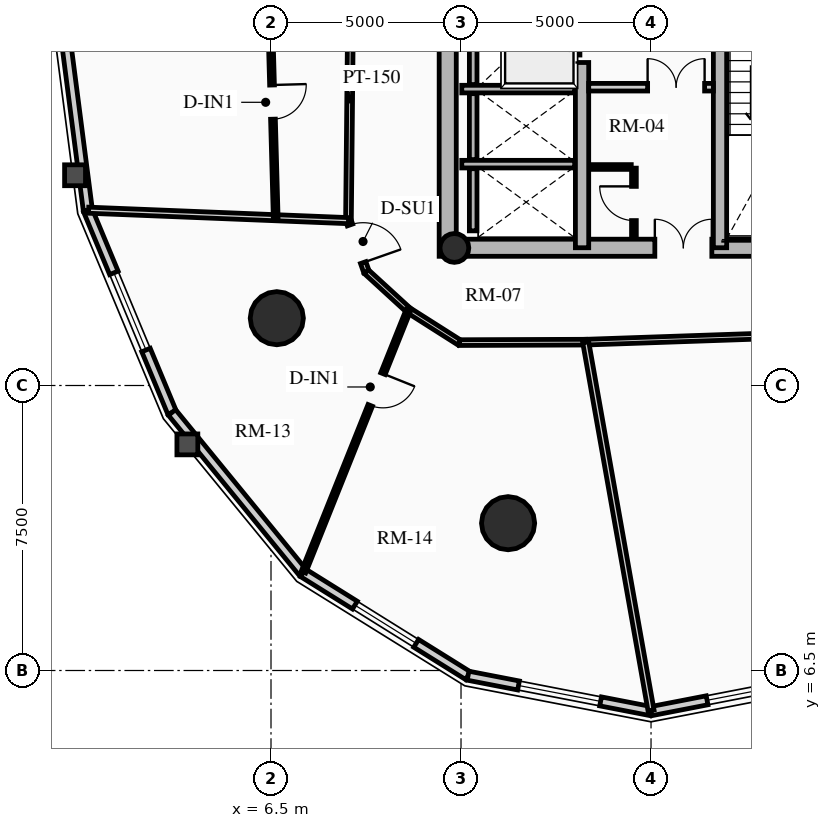
"""IFC4 building model, lengths in metres.
Left out: names, types, materials, properties, quantities, classifications, styles, units other than length and angle.
Written with IfcOpenShell. Run it as: python <this file> out.ifc"""

import sys

from ifc_helpers import new_model, si_unit, direction, frame, frame_2d, origin, origin_2d, place, context, subcontext, project, spatial, rectangle, circle, hollow_circle, extrude, source, transform, mapped, element, fill, save


model = new_model("IFC4")
c1 = context("Model", 3, precision=1e-05, world=origin(), true_north=direction((0.0, 1.0)))
c2 = subcontext(c1, "Body", "Model", "MODEL_VIEW")
j1 = project(units=[si_unit("LENGTHUNIT", "METRE"), si_unit("PLANEANGLEUNIT", "RADIAN")], contexts=[c1])
p1 = place(None, origin())
s1 = spatial("IfcSite", under=j1, at=p1, CompositionType="ELEMENT")
p2 = place(p1, origin())
s2 = spatial("IfcBuilding", under=s1, at=p2, CompositionType="ELEMENT")
p3 = place(p2, frame((0.0, 0.0, 116.71)))
s3 = spatial("IfcBuildingStorey", under=s2, at=p3, CompositionType="ELEMENT", Elevation=116.71)
p4 = place(p3, frame((11.15, 17.4, 0.0), z_axis=(0.0, 0.0, 1.0), x_axis=(0.0, 1.0, 0.0)))
e1 = element("IfcWall", 1, at=p4, inside=s3, PredefinedType="SHEAR", context=c2, shape_type="SweptSolid", body=[
    extrude(rectangle(XDim=14.2, YDim=0.45, at=frame_2d((7.1, 0.0))), origin(), (0.0, 0.0, 1.0), 2.91),
])
p5 = place(p3, frame((11.15, 17.625, 0.0), z_axis=(0.0, 0.0, 1.0), x_axis=(1.0, 0.0, 0.0)))
e2 = element("IfcWall", 2, at=p5, inside=s3, PredefinedType="SHEAR", context=c2, shape_type="SweptSolid", body=[
    extrude(rectangle(XDim=10.7, YDim=0.45, at=frame_2d((5.35, 0.0))), origin(), (0.0, 0.0, 1.0), 2.91),
])
m1 = source(origin(), c2, "Body", "SweptSolid", [
    extrude(rectangle(XDim=1.5, YDim=2.02, at=frame_2d((0.75, 1.01))), frame((0.0, 0.235, 0.0), z_axis=(0.0, -1.0, 0.0), x_axis=(1.0, 0.0, 0.0)), (0.0, 0.0, 1.0), 0.47),
])
p6 = place(p5, frame((5.45, 0.0, 0.0)))
e3 = element("IfcOpeningElement", 3, at=p6, cuts=e2, PredefinedType="OPENING", context=c2, shape_type="MappedRepresentation", body=[
    mapped(m1, transform((0.0, 0.0, 0.0), x_axis=(1.0, 0.0, 0.0), y_axis=(0.0, 1.0, 0.0), z_axis=(0.0, 0.0, 1.0), scale=1.0)),
])
p7 = place(p3, frame((14.685, 17.625, 0.0), z_axis=(0.0, 0.0, 1.0), x_axis=(0.0, 1.0, 0.0)))
e4 = element("IfcWall", 4, at=p7, inside=s3, PredefinedType="SHEAR", context=c2, shape_type="SweptSolid", body=[
    extrude(rectangle(XDim=13.75, YDim=0.35, at=frame_2d((6.875, 0.0))), origin(), (0.0, 0.0, 1.0), 2.91),
])
m2 = source(origin(), c2, "Body", "SweptSolid", [
    extrude(rectangle(XDim=1.1, YDim=2.015, at=frame_2d((0.55, 1.007))), frame((0.0, 0.185, 0.0), z_axis=(0.0, -1.0, 0.0), x_axis=(1.0, 0.0, 0.0)), (0.0, 0.0, 1.0), 0.37),
])
p8 = place(p7, frame((4.875, 0.0, 0.0)))
e5 = element("IfcOpeningElement", 5, at=p8, cuts=e4, PredefinedType="OPENING", context=c2, shape_type="MappedRepresentation", body=[
    mapped(m2, transform((0.0, 0.0, 0.0), x_axis=(1.0, 0.0, 0.0), y_axis=(0.0, 1.0, 0.0), z_axis=(0.0, 0.0, 1.0), scale=1.0)),
])
m3 = source(origin(), c2, "Body", "SweptSolid", [
    extrude(rectangle(XDim=1.15, YDim=2.02, at=frame_2d((0.575, 1.01))), frame((0.0, 0.185, 0.0), z_axis=(0.0, -1.0, 0.0), x_axis=(1.0, 0.0, 0.0)), (0.0, 0.0, 1.0), 0.37),
])
p9 = place(p7, frame((7.295, 0.0, 0.0)))
e6 = element("IfcOpeningElement", 6, at=p9, cuts=e4, PredefinedType="OPENING", context=c2, shape_type="MappedRepresentation", body=[
    mapped(m3, transform((0.0, 0.0, 0.0), x_axis=(1.0, 0.0, 0.0), y_axis=(0.0, 1.0, 0.0), z_axis=(0.0, 0.0, 1.0), scale=1.0)),
])
p10 = place(p3, frame((18.315, 17.625, 0.0), z_axis=(0.0, 0.0, 1.0), x_axis=(0.0, 1.0, 0.0)))
e7 = element("IfcWall", 7, at=p10, inside=s3, PredefinedType="SHEAR", context=c2, shape_type="SweptSolid", body=[
    extrude(rectangle(XDim=13.75, YDim=0.35, at=frame_2d((6.875, 0.0))), origin(), (0.0, 0.0, 1.0), 2.91),
])
p11 = place(p10, frame((10.0, 0.0, 0.0)))
e8 = element("IfcOpeningElement", 8, at=p11, cuts=e7, PredefinedType="OPENING", context=c2, shape_type="MappedRepresentation", body=[
    mapped(m2, transform((0.0, 0.0, 0.0), x_axis=(1.0, 0.0, 0.0), y_axis=(0.0, 1.0, 0.0), z_axis=(0.0, 0.0, 1.0), scale=1.0)),
])
p12 = place(p10, frame((12.0, 0.0, 0.0)))
e9 = element("IfcOpeningElement", 9, at=p12, cuts=e7, PredefinedType="OPENING", context=c2, shape_type="MappedRepresentation", body=[
    mapped(m2, transform((0.0, 0.0, 0.0), x_axis=(1.0, 0.0, 0.0), y_axis=(0.0, 1.0, 0.0), z_axis=(0.0, 0.0, 1.0), scale=1.0)),
])
p13 = place(p10, frame((5.305, 0.0, 0.0)))
e10 = element("IfcOpeningElement", 10, at=p13, cuts=e7, PredefinedType="OPENING", context=c2, shape_type="MappedRepresentation", body=[
    mapped(m3, transform((0.0, 0.0, 0.0), x_axis=(1.0, 0.0, 0.0), y_axis=(0.0, 1.0, 0.0), z_axis=(0.0, 0.0, 1.0), scale=1.0)),
])
p14 = place(p3, frame((11.325, 17.62, 0.0), z_axis=(0.0, 0.0, 1.0), x_axis=(1.0, 0.0, 0.0)))
e11 = element("IfcColumn", 11, at=p14, inside=s3, PredefinedType="COLUMN", context=c2, shape_type="SweptSolid", body=[
    extrude(hollow_circle(Radius=0.38, WallThickness=0.032, at=origin_2d()), origin(), (0.0, 0.0, 1.0), 2.91),
])
for number, where, z_axis, x_axis in (
    (12, (6.653, 15.771, 0.0), (0.0, 0.0, 1.0), (1.0, 0.0, 0.0)),
    (13, (12.739, 10.377, 0.0), (0.0, 0.0, 1.0), (1.0, 0.0, 0.0)),
):
    element("IfcColumn", number, at=place(p3, frame(where, z_axis=z_axis, x_axis=x_axis)), inside=s3, PredefinedType="USERDEFINED", context=c2, shape_type="SweptSolid", body=[
        extrude(circle(Radius=0.7, at=origin_2d()), origin(), (0.0, 0.0, 1.0), 2.91),
    ])
p15 = place(p3, frame((1.682, 18.607, 0.0), z_axis=(0.0, 0.0, 1.0), x_axis=(-0.128351991996, 0.991728675672, 0.0)))
e14 = element("IfcWall", 14, at=p15, inside=s3, PredefinedType="SOLIDWALL", context=c2, shape_type="SweptSolid", body=[
    extrude(rectangle(XDim=5.942, YDim=0.24, at=frame_2d((2.971, 0.0))), origin(), (0.0, 0.0, 1.0), 2.179),
])
p16 = place(p3, frame((3.895, 13.291, 0.0), z_axis=(0.0, 0.0, 1.0), x_axis=(-0.384344417632, 0.923189779317, 0.0)))
e15 = element("IfcWall", 15, at=p16, inside=s3, PredefinedType="SOLIDWALL", context=c2, shape_type="SweptSolid", body=[
    extrude(rectangle(XDim=5.758, YDim=0.24, at=frame_2d((2.879, 0.0))), origin(), (0.0, 0.0, 1.0), 2.179),
])
m4 = source(origin(), c2, "Body", "SweptSolid", [
    extrude(rectangle(XDim=2.2, YDim=1.35, at=frame_2d((1.1, 0.675))), frame((0.0, 0.13, 0.0), z_axis=(0.0, -1.0, 0.0), x_axis=(1.0, 0.0, 0.0)), (0.0, 0.0, 1.0), 0.26),
])
p17 = place(p16, frame((1.779, 0.0, 0.65)))
e16 = element("IfcOpeningElement", 16, at=p17, cuts=e15, PredefinedType="OPENING", context=c2, shape_type="MappedRepresentation", body=[
    mapped(m4, transform((0.0, 0.0, 0.0), x_axis=(1.0, 0.0, 0.0), y_axis=(0.0, 1.0, 0.0), z_axis=(0.0, 0.0, 1.0), scale=1.0)),
])
p18 = place(p3, frame((7.342, 9.072, 0.0), z_axis=(0.0, 0.0, 1.0), x_axis=(-0.632700781152, 0.77439635945, 0.0)))
e17 = element("IfcWall", 17, at=p18, inside=s3, PredefinedType="SOLIDWALL", context=c2, shape_type="SweptSolid", body=[
    extrude(rectangle(XDim=5.448, YDim=0.24, at=frame_2d((2.724, 0.0))), origin(), (0.0, 0.0, 1.0), 2.179),
])
p19 = place(p3, frame((11.685, 6.363, 0.0), z_axis=(0.0, 0.0, 1.0), x_axis=(-0.848520380187, 0.529162701263, 0.0)))
e18 = element("IfcWall", 18, at=p19, inside=s3, PredefinedType="SOLIDWALL", context=c2, shape_type="SweptSolid", body=[
    extrude(rectangle(XDim=5.119, YDim=0.24, at=frame_2d((2.56, 0.0))), origin(), (0.0, 0.0, 1.0), 2.179),
])
m5 = source(origin(), c2, "Body", "SweptSolid", [
    extrude(rectangle(XDim=1.9, YDim=1.35, at=frame_2d((0.95, 0.675))), frame((0.0, 0.13, 0.0), z_axis=(0.0, -1.0, 0.0), x_axis=(1.0, 0.0, 0.0)), (0.0, 0.0, 1.0), 0.26),
])
p20 = place(p19, frame((1.609, 0.0, 0.65)))
e19 = element("IfcOpeningElement", 19, at=p20, cuts=e18, PredefinedType="OPENING", context=c2, shape_type="MappedRepresentation", body=[
    mapped(m5, transform((0.0, 0.0, 0.0), x_axis=(1.0, 0.0, 0.0), y_axis=(0.0, 1.0, 0.0), z_axis=(0.0, 0.0, 1.0), scale=1.0)),
])
p21 = place(p3, frame((16.5, 5.43, 0.0), z_axis=(0.0, 0.0, 1.0), x_axis=(-0.981723785992, 0.190311344954, 0.0)))
e20 = element("IfcWall", 20, at=p21, inside=s3, PredefinedType="SOLIDWALL", context=c2, shape_type="SweptSolid", body=[
    extrude(rectangle(XDim=4.904, YDim=0.24, at=frame_2d((2.452, 0.0))), origin(), (0.0, 0.0, 1.0), 2.179),
])
p22 = place(p21, frame((1.352, 0.0, 0.65)))
e21 = element("IfcOpeningElement", 21, at=p22, cuts=e20, PredefinedType="OPENING", context=c2, shape_type="MappedRepresentation", body=[
    mapped(m4, transform((0.0, 0.0, 0.0), x_axis=(1.0, 0.0, 0.0), y_axis=(0.0, 1.0, 0.0), z_axis=(0.0, 0.0, 1.0), scale=1.0)),
])
p23 = place(p3, frame((21.315, 6.363, 0.0), z_axis=(0.0, 0.0, 1.0), x_axis=(-0.981723785992, -0.190311344954, 0.0)))
e22 = element("IfcWall", 22, at=p23, inside=s3, PredefinedType="SOLIDWALL", context=c2, shape_type="SweptSolid", body=[
    extrude(rectangle(XDim=4.904, YDim=0.24, at=frame_2d((2.452, 0.0))), origin(), (0.0, 0.0, 1.0), 2.179),
])
p24 = place(p23, frame((1.502, 0.0, 0.65)))
e23 = element("IfcOpeningElement", 23, at=p24, cuts=e22, PredefinedType="OPENING", context=c2, shape_type="MappedRepresentation", body=[
    mapped(m5, transform((0.0, 0.0, 0.0), x_axis=(1.0, 0.0, 0.0), y_axis=(0.0, 1.0, 0.0), z_axis=(0.0, 0.0, 1.0), scale=1.0)),
])
p25 = place(p3, frame((11.52, 21.8, 0.0), z_axis=(0.0, 0.0, 1.0), x_axis=(1.0, 0.0, 0.0)))
e24 = element("IfcWall", 24, at=p25, inside=s3, PredefinedType="SHEAR", context=c2, shape_type="SweptSolid", body=[
    extrude(rectangle(XDim=2.97, YDim=0.2, at=frame_2d((1.485, 0.0))), origin(), (0.0, 0.0, 1.0), 2.91),
])
p26 = place(p3, frame((11.82, 21.92, 0.0), z_axis=(0.0, 0.0, 1.0), x_axis=(0.0, 1.0, 0.0)))
e25 = element("IfcWall", 25, at=p26, inside=s3, PredefinedType="SHEAR", context=c2, shape_type="SweptSolid", body=[
    extrude(rectangle(XDim=2.44, YDim=0.2, at=frame_2d((1.22, 0.0))), origin(), (0.0, 0.0, 1.0), 2.91),
])
p27 = place(p3, frame((11.52, 19.825, 0.0), z_axis=(0.0, 0.0, 1.0), x_axis=(1.0, 0.0, 0.0)))
e26 = element("IfcWall", 26, at=p27, inside=s3, PredefinedType="SHEAR", context=c2, shape_type="SweptSolid", body=[
    extrude(rectangle(XDim=2.97, YDim=0.2, at=frame_2d((1.485, 0.0))), origin(), (0.0, 0.0, 1.0), 2.91),
])
p28 = place(p3, frame((11.82, 19.945, 0.0), z_axis=(0.0, 0.0, 1.0), x_axis=(0.0, 1.0, 0.0)))
e27 = element("IfcWall", 27, at=p28, inside=s3, PredefinedType="SHEAR", context=c2, shape_type="SweptSolid", body=[
    extrude(rectangle(XDim=1.735, YDim=0.2, at=frame_2d((0.867, 0.0))), origin(), (0.0, 0.0, 1.0), 2.91),
])
p29 = place(p3, frame((11.82, 18.07, 0.0), z_axis=(0.0, 0.0, 1.0), x_axis=(0.0, 1.0, 0.0)))
e28 = element("IfcWall", 28, at=p29, inside=s3, PredefinedType="SHEAR", context=c2, shape_type="SweptSolid", body=[
    extrude(rectangle(XDim=1.635, YDim=0.2, at=frame_2d((0.817, 0.0))), origin(), (0.0, 0.0, 1.0), 2.91),
])
p30 = place(p3, frame((14.86, 21.85, 0.0), z_axis=(0.0, 0.0, 1.0), x_axis=(1.0, 0.0, 0.0)))
e29 = element("IfcWall", 29, at=p30, inside=s3, PredefinedType="PARTITIONING", context=c2, shape_type="SweptSolid", body=[
    extrude(rectangle(XDim=3.28, YDim=0.2, at=frame_2d((1.64, 0.0))), origin(), (0.0, 0.0, 1.0), 2.655),
])
m6 = source(origin(), c2, "Body", "SweptSolid", [
    extrude(rectangle(XDim=1.5, YDim=2.02, at=frame_2d((0.75, 1.01))), frame((0.0, 0.11, 0.0), z_axis=(0.0, -1.0, 0.0), x_axis=(1.0, 0.0, 0.0)), (0.0, 0.0, 1.0), 0.22),
])
p31 = place(p30, frame((1.55, 0.0, 0.0)))
e30 = element("IfcOpeningElement", 30, at=p31, cuts=e29, PredefinedType="OPENING", context=c2, shape_type="MappedRepresentation", body=[
    mapped(m6, transform((0.0, 0.0, 0.0), x_axis=(1.0, 0.0, 0.0), y_axis=(0.0, 1.0, 0.0), z_axis=(0.0, 0.0, 1.0), scale=1.0)),
])
p32 = place(p3, frame((16.05, 17.92, 0.0), z_axis=(0.0, 0.0, 1.0), x_axis=(0.0, 1.0, 0.0)))
e31 = element("IfcWall", 31, at=p32, inside=s3, PredefinedType="PARTITIONING", context=c2, shape_type="SweptSolid", body=[
    extrude(rectangle(XDim=1.8, YDim=0.125, at=frame_2d((0.9, 0.0))), origin(), (0.0, 0.0, 1.0), 2.655),
])
m7 = source(origin(), c2, "Body", "SweptSolid", [
    extrude(rectangle(XDim=0.9, YDim=2.005, at=frame_2d((0.45, 1.002))), frame((0.0, 0.073, 0.0), z_axis=(0.0, -1.0, 0.0), x_axis=(1.0, 0.0, 0.0)), (0.0, 0.0, 1.0), 0.145),
])
p33 = place(p32, frame((0.42, 0.0, 0.0)))
e32 = element("IfcOpeningElement", 32, at=p33, cuts=e31, PredefinedType="OPENING", context=c2, shape_type="MappedRepresentation", body=[
    mapped(m7, transform((0.0, 0.0, 0.0), x_axis=(1.0, 0.0, 0.0), y_axis=(0.0, 1.0, 0.0), z_axis=(0.0, 0.0, 1.0), scale=1.0)),
])
p34 = place(p3, frame((14.88, 19.75, 0.0), z_axis=(0.0, 0.0, 1.0), x_axis=(1.0, 0.0, 0.0)))
e33 = element("IfcWall", 33, at=p34, inside=s3, PredefinedType="PARTITIONING", context=c2, shape_type="SweptSolid", body=[
    extrude(rectangle(XDim=1.1, YDim=0.125, at=frame_2d((0.55, 0.0))), origin(), (0.0, 0.0, 1.0), 2.655),
])
p35 = place(p3, frame((8.6, 24.5, 0.0), z_axis=(0.0, 0.0, 1.0), x_axis=(-0.010023665349, -0.999949761805, 0.0)))
e34 = element("IfcWall", 34, at=p35, inside=s3, PredefinedType="PARTITIONING", context=c2, shape_type="SweptSolid", body=[
    extrude(rectangle(XDim=6.162, YDim=0.15, at=frame_2d((3.081, 0.0))), origin(), (0.0, 0.0, 1.0), 2.225),
])
p36 = place(p3, frame((8.538, 18.338, 0.0), z_axis=(0.0, 0.0, 1.0), x_axis=(0.331358150167, -0.94350504838, 0.0)))
e35 = element("IfcWall", 35, at=p36, inside=s3, PredefinedType="PARTITIONING", context=c2, shape_type="SweptSolid", body=[
    extrude(rectangle(XDim=1.424, YDim=0.15, at=frame_2d((0.712, 0.0))), origin(), (0.0, 0.0, 1.0), 2.225),
])
m8 = source(origin(), c2, "Body", "SweptSolid", [
    extrude(rectangle(XDim=1.05, YDim=2.015, at=frame_2d((0.525, 1.007))), frame((0.0, 0.085, 0.0), z_axis=(0.0, -1.0, 0.0), x_axis=(1.0, 0.0, 0.0)), (0.0, 0.0, 1.0), 0.17),
])
p37 = place(p36, frame((0.12, 0.0, 0.0)))
e36 = element("IfcOpeningElement", 36, at=p37, cuts=e35, PredefinedType="OPENING", context=c2, shape_type="MappedRepresentation", body=[
    mapped(m8, transform((0.0, 0.0, 0.0), x_axis=(1.0, 0.0, 0.0), y_axis=(0.0, 1.0, 0.0), z_axis=(0.0, 0.0, 1.0), scale=1.0)),
])
p38 = place(p3, frame((9.01, 16.994, 0.0), z_axis=(0.0, 0.0, 1.0), x_axis=(0.737701798986, -0.67512669609, 0.0)))
e37 = element("IfcWall", 37, at=p38, inside=s3, PredefinedType="PARTITIONING", context=c2, shape_type="SweptSolid", body=[
    extrude(rectangle(XDim=1.498, YDim=0.15, at=frame_2d((0.749, 0.0))), origin(), (0.0, 0.0, 1.0), 2.225),
])
p39 = place(p3, frame((10.115, 15.983, 0.0), z_axis=(0.0, 0.0, 1.0), x_axis=(0.843995849351, -0.536349705209, 0.0)))
e38 = element("IfcWall", 38, at=p39, inside=s3, PredefinedType="PARTITIONING", context=c2, shape_type="SweptSolid", body=[
    extrude(rectangle(XDim=1.593, YDim=0.15, at=frame_2d((0.796, 0.0))), origin(), (0.0, 0.0, 1.0), 2.225),
])
p40 = place(p3, frame((11.46, 15.129, 0.0), z_axis=(0.0, 0.0, 1.0), x_axis=(0.999993513287, 0.003601858435, 0.0)))
e39 = element("IfcWall", 39, at=p40, inside=s3, PredefinedType="PARTITIONING", context=c2, shape_type="SweptSolid", body=[
    extrude(rectangle(XDim=3.321, YDim=0.15, at=frame_2d((1.661, 0.0))), origin(), (0.0, 0.0, 1.0), 2.225),
])
p41 = place(p3, frame((14.781, 15.141, 0.0), z_axis=(0.0, 0.0, 1.0), x_axis=(0.999407918707, 0.034406569513, 0.0)))
e40 = element("IfcWall", 40, at=p41, inside=s3, PredefinedType="PARTITIONING", context=c2, shape_type="SweptSolid", body=[
    extrude(rectangle(XDim=6.642, YDim=0.15, at=frame_2d((3.321, 0.0))), origin(), (0.0, 0.0, 1.0), 2.225),
])
p42 = place(p3, frame((8.538, 18.338, 0.0), z_axis=(0.0, 0.0, 1.0), x_axis=(-0.999191355531, 0.04020740021, 0.0)))
e41 = element("IfcWall", 41, at=p42, inside=s3, PredefinedType="PARTITIONING", context=c2, shape_type="SweptSolid", body=[
    extrude(rectangle(XDim=6.843, YDim=0.16, at=frame_2d((3.422, 0.0))), origin(), (0.0, 0.0, 1.0), 2.179),
])
p43 = place(p3, frame((14.781, 15.141, 0.0), z_axis=(0.0, 0.0, 1.0), x_axis=(0.174659805548, -0.984628839881, 0.0)))
e42 = element("IfcWall", 42, at=p43, inside=s3, PredefinedType="PARTITIONING", context=c2, shape_type="SweptSolid", body=[
    extrude(rectangle(XDim=9.842, YDim=0.16, at=frame_2d((4.921, 0.0))), origin(), (0.0, 0.0, 1.0), 2.179),
])
p44 = place(p3, frame((6.455, 24.5, 0.0), z_axis=(0.0, 0.0, 1.0), x_axis=(0.027753708707, -0.999614791634, 0.0)))
e43 = element("IfcWall", 43, at=p44, inside=s3, PredefinedType="PARTITIONING", context=c2, shape_type="SweptSolid", body=[
    extrude(rectangle(XDim=6.087, YDim=0.125, at=frame_2d((3.044, 0.0))), origin(), (0.0, 0.0, 1.0), 2.225),
])
p45 = place(p44, frame((2.594, 0.0, 0.0)))
e44 = element("IfcOpeningElement", 44, at=p45, cuts=e43, PredefinedType="OPENING", context=c2, shape_type="MappedRepresentation", body=[
    mapped(m7, transform((0.0, 0.0, 0.0), x_axis=(1.0, 0.0, 0.0), y_axis=(0.0, 1.0, 0.0), z_axis=(0.0, 0.0, 1.0), scale=1.0)),
])
p46 = place(p3, frame((10.115, 15.983, 0.0), z_axis=(0.0, 0.0, 1.0), x_axis=(-0.371861013147, -0.928288417951, 0.0)))
e45 = element("IfcWall", 45, at=p46, inside=s3, PredefinedType="PARTITIONING", context=c2, shape_type="SweptSolid", body=[
    extrude(rectangle(XDim=7.427, YDim=0.125, at=frame_2d((3.714, 0.0))), origin(), (0.0, 0.0, 1.0), 2.179),
])
p47 = place(p46, frame((1.8, 0.0, 0.0)))
e46 = element("IfcOpeningElement", 46, at=p47, cuts=e45, PredefinedType="OPENING", context=c2, shape_type="MappedRepresentation", body=[
    mapped(m7, transform((0.0, 0.0, 0.0), x_axis=(1.0, 0.0, 0.0), y_axis=(0.0, 1.0, 0.0), z_axis=(0.0, 0.0, 1.0), scale=1.0)),
])
m9 = source(origin(), c2, "Body", "SweptSolid", [
    extrude(rectangle(XDim=2.2, YDim=1.35, at=frame_2d((1.1, 0.675))), frame((0.0, 0.03, 0.0), z_axis=(0.0, -1.0, 0.0), x_axis=(1.0, 0.0, 0.0)), (0.0, 0.0, 1.0), 0.06),
])
p48 = place(p17, origin())
e47 = element("IfcWindow", 47, at=p48, inside=s3, PartitioningType="DOUBLE_PANEL_VERTICAL", PredefinedType="WINDOW", context=c2, shape_type="MappedRepresentation", body=[
    mapped(m9, transform((0.0, 0.0, 0.0), x_axis=(1.0, 0.0, 0.0), y_axis=(0.0, 1.0, 0.0), z_axis=(0.0, 0.0, 1.0), scale=1.0)),
])
fill(e16, e47)
m10 = source(origin(), c2, "Body", "SweptSolid", [
    extrude(rectangle(XDim=1.9, YDim=1.35, at=frame_2d((0.95, 0.675))), frame((0.0, 0.03, 0.0), z_axis=(0.0, -1.0, 0.0), x_axis=(1.0, 0.0, 0.0)), (0.0, 0.0, 1.0), 0.06),
])
p49 = place(p20, origin())
e48 = element("IfcWindow", 48, at=p49, inside=s3, PartitioningType="DOUBLE_PANEL_VERTICAL", PredefinedType="WINDOW", context=c2, shape_type="MappedRepresentation", body=[
    mapped(m10, transform((0.0, 0.0, 0.0), x_axis=(1.0, 0.0, 0.0), y_axis=(0.0, 1.0, 0.0), z_axis=(0.0, 0.0, 1.0), scale=1.0)),
])
fill(e19, e48)
p50 = place(p22, origin())
e49 = element("IfcWindow", 49, at=p50, inside=s3, PartitioningType="DOUBLE_PANEL_VERTICAL", PredefinedType="WINDOW", context=c2, shape_type="MappedRepresentation", body=[
    mapped(m9, transform((0.0, 0.0, 0.0), x_axis=(1.0, 0.0, 0.0), y_axis=(0.0, 1.0, 0.0), z_axis=(0.0, 0.0, 1.0), scale=1.0)),
])
fill(e21, e49)
p51 = place(p24, origin())
e50 = element("IfcWindow", 50, at=p51, inside=s3, PartitioningType="DOUBLE_PANEL_VERTICAL", PredefinedType="WINDOW", context=c2, shape_type="MappedRepresentation", body=[
    mapped(m10, transform((0.0, 0.0, 0.0), x_axis=(1.0, 0.0, 0.0), y_axis=(0.0, 1.0, 0.0), z_axis=(0.0, 0.0, 1.0), scale=1.0)),
])
fill(e23, e50)
m11 = source(origin(), c2, "Body", "SweptSolid", [
    extrude(rectangle(XDim=1.1, YDim=2.015, at=frame_2d((0.55, 1.007))), frame((0.0, 0.025, 0.0), z_axis=(0.0, -1.0, 0.0), x_axis=(1.0, 0.0, 0.0)), (0.0, 0.0, 1.0), 0.05),
])
p52 = place(p8, origin())
e51 = element("IfcDoor", 51, at=p52, inside=s3, OperationType="SLIDING_TO_RIGHT", PredefinedType="DOOR", context=c2, shape_type="MappedRepresentation", body=[
    mapped(m11, transform((0.0, 0.0, 0.0), x_axis=(1.0, 0.0, 0.0), y_axis=(0.0, 1.0, 0.0), z_axis=(0.0, 0.0, 1.0), scale=1.0)),
])
fill(e5, e51)
m12 = source(origin(), c2, "Body", "SweptSolid", [
    extrude(rectangle(XDim=1.5, YDim=2.02, at=frame_2d((0.75, 1.01))), frame((0.0, 0.025, 0.0), z_axis=(0.0, -1.0, 0.0), x_axis=(1.0, 0.0, 0.0)), (0.0, 0.0, 1.0), 0.05),
])
p53 = place(p6, origin())
e52 = element("IfcDoor", 52, at=p53, inside=s3, OperationType="DOUBLE_DOOR_SINGLE_SWING", PredefinedType="DOOR", context=c2, shape_type="MappedRepresentation", body=[
    mapped(m12, transform((0.0, 0.0, 0.0), x_axis=(1.0, 0.0, 0.0), y_axis=(0.0, 1.0, 0.0), z_axis=(0.0, 0.0, 1.0), scale=1.0)),
])
fill(e3, e52)
p54 = place(p31, origin())
e53 = element("IfcDoor", 53, at=p54, inside=s3, OperationType="DOUBLE_DOOR_SINGLE_SWING", PredefinedType="DOOR", context=c2, shape_type="MappedRepresentation", body=[
    mapped(m12, transform((0.0, 0.0, 0.0), x_axis=(1.0, 0.0, 0.0), y_axis=(0.0, 1.0, 0.0), z_axis=(0.0, 0.0, 1.0), scale=1.0)),
])
fill(e30, e53)
m13 = source(origin(), c2, "Body", "SweptSolid", [
    extrude(rectangle(XDim=0.9, YDim=2.005, at=frame_2d((0.45, 1.002))), frame((0.0, 0.025, 0.0), z_axis=(0.0, -1.0, 0.0), x_axis=(1.0, 0.0, 0.0)), (0.0, 0.0, 1.0), 0.05),
])
p55 = place(p33, origin())
e54 = element("IfcDoor", 54, at=p55, inside=s3, OperationType="SINGLE_SWING_RIGHT", PredefinedType="DOOR", context=c2, shape_type="MappedRepresentation", body=[
    mapped(m13, transform((0.0, 0.0, 0.0), x_axis=(1.0, 0.0, 0.0), y_axis=(0.0, 1.0, 0.0), z_axis=(0.0, 0.0, 1.0), scale=1.0)),
])
fill(e32, e54)
p56 = place(p45, origin())
e55 = element("IfcDoor", 55, at=p56, inside=s3, OperationType="SINGLE_SWING_LEFT", PredefinedType="DOOR", context=c2, shape_type="MappedRepresentation", body=[
    mapped(m13, transform((0.0, 0.0, 0.0), x_axis=(1.0, 0.0, 0.0), y_axis=(0.0, 1.0, 0.0), z_axis=(0.0, 0.0, 1.0), scale=1.0)),
])
fill(e44, e55)
m14 = source(origin(), c2, "Body", "SweptSolid", [
    extrude(rectangle(XDim=1.05, YDim=2.015, at=frame_2d((0.525, 1.007))), frame((0.0, 0.025, 0.0), z_axis=(0.0, -1.0, 0.0), x_axis=(1.0, 0.0, 0.0)), (0.0, 0.0, 1.0), 0.05),
])
p57 = place(p37, origin())
e56 = element("IfcDoor", 56, at=p57, inside=s3, OperationType="SINGLE_SWING_RIGHT", PredefinedType="DOOR", context=c2, shape_type="MappedRepresentation", body=[
    mapped(m14, transform((0.0, 0.0, 0.0), x_axis=(1.0, 0.0, 0.0), y_axis=(0.0, 1.0, 0.0), z_axis=(0.0, 0.0, 1.0), scale=1.0)),
])
fill(e36, e56)
p58 = place(p47, origin())
e57 = element("IfcDoor", 57, at=p58, inside=s3, OperationType="SINGLE_SWING_LEFT", PredefinedType="DOOR", context=c2, shape_type="MappedRepresentation", body=[
    mapped(m13, transform((0.0, 0.0, 0.0), x_axis=(1.0, 0.0, 0.0), y_axis=(0.0, 1.0, 0.0), z_axis=(0.0, 0.0, 1.0), scale=1.0)),
])
fill(e46, e57)
save(model, sys.argv[1])
